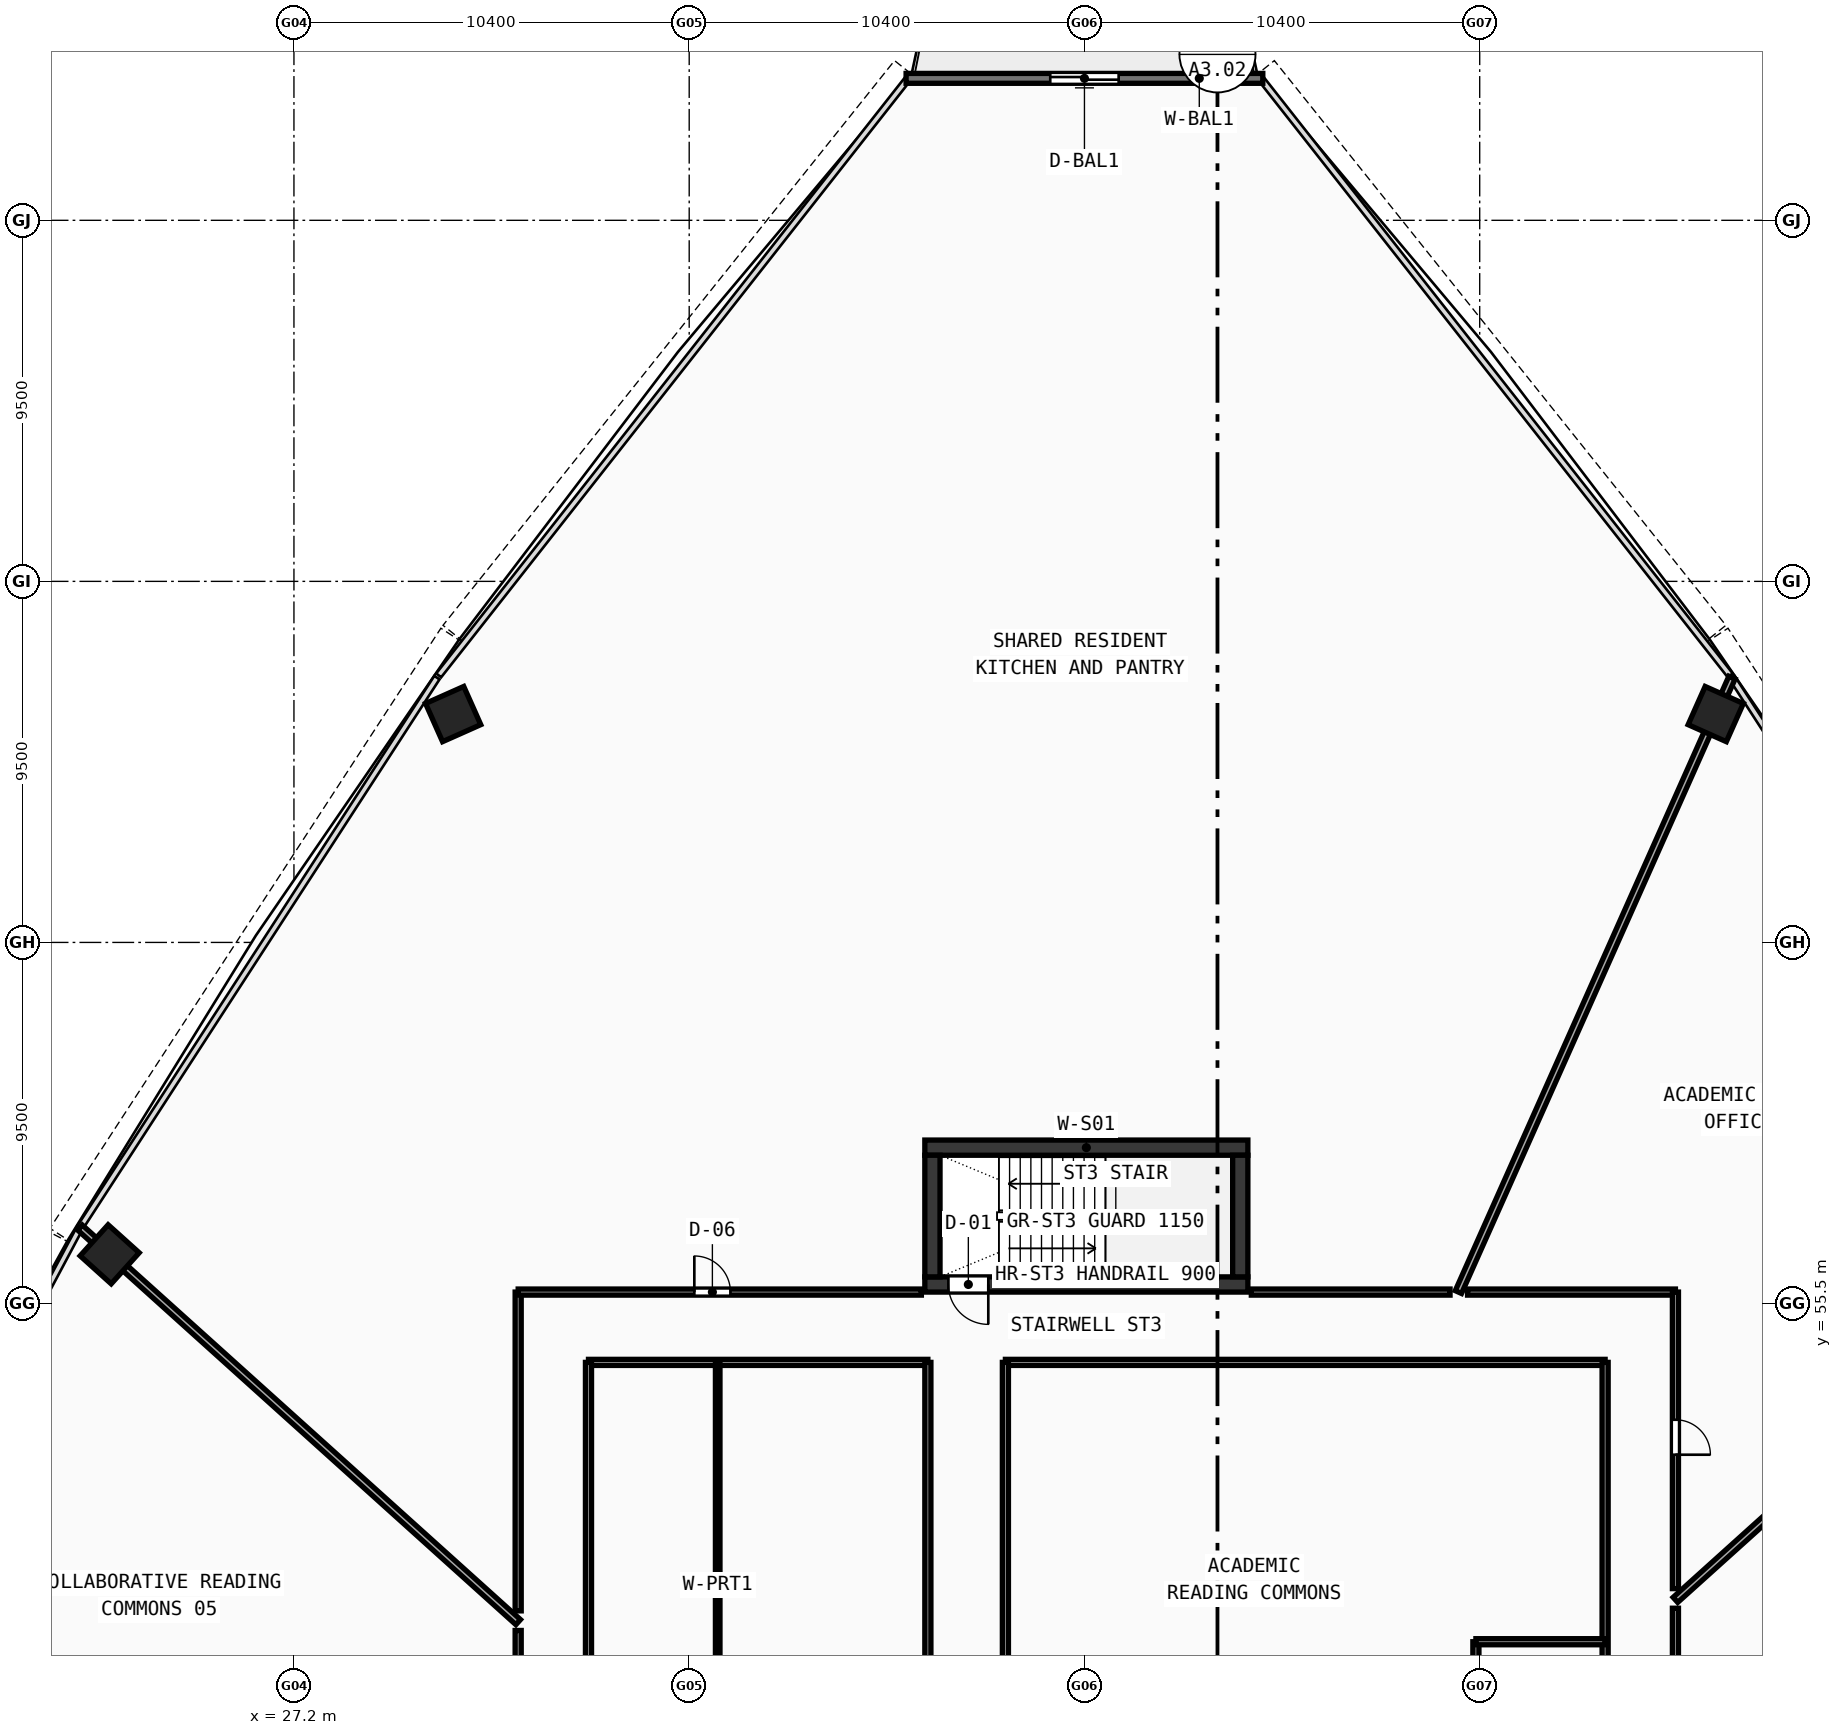
"""IFC4 building model, lengths in metres.
Left out: names, types, materials, properties, quantities, classifications, styles, units other than length and angle.
Written with IfcOpenShell. Run it as: python <this file> out.ifc"""

import sys

from ifc_helpers import new_model, si_unit, direction, frame, frame_2d, origin, origin_with_axes, origin_2d, place, context, subcontext, project, spatial, rectangle, hollow_rectangle, extrude, source, transform, mapped, element, fill, save


model = new_model("IFC4")
c1 = context("Model", 3, precision=1e-05, world=origin(), true_north=direction((0.0, 1.0)))
c2 = subcontext(c1, "Body", "Model", "MODEL_VIEW")
j1 = project(units=[si_unit("LENGTHUNIT", "METRE"), si_unit("PLANEANGLEUNIT", "RADIAN")], contexts=[c1])
p1 = place(None, origin())
s1 = spatial("IfcSite", under=j1, at=p1, CompositionType="ELEMENT")
p2 = place(p1, origin())
s2 = spatial("IfcBuilding", under=s1, at=p2, CompositionType="ELEMENT")
p3 = place(p2, frame((0.0, 0.0, 66.7)))
s3 = spatial("IfcBuildingStorey", under=s2, at=p3, CompositionType="ELEMENT", Elevation=66.7)
p4 = place(p3, frame((43.8, 59.6, 0.0), z_axis=(0.0, 0.0, 1.0), x_axis=(1.0, 0.0, 0.0)))
e1 = element("IfcWall", 1, at=p4, inside=s3, PredefinedType="SHEAR", context=c2, shape_type="SweptSolid", body=[
    extrude(rectangle(XDim=8.5, YDim=0.4, at=frame_2d((4.25, 0.0))), origin(), (0.0, 0.0, 1.0), 3.37),
])
p5 = place(p3, frame((43.8, 56.0, 0.0), z_axis=(0.0, 0.0, 1.0), x_axis=(1.0, 0.0, 0.0)))
e2 = element("IfcWall", 2, at=p5, inside=s3, PredefinedType="SHEAR", context=c2, shape_type="SweptSolid", body=[
    extrude(rectangle(XDim=8.5, YDim=0.4, at=frame_2d((4.25, 0.0))), origin(), (0.0, 0.0, 1.0), 3.37),
])
p6 = place(p5, frame((0.62, 0.0, 0.0)))
e3 = element("IfcOpeningElement", 3, at=p6, cuts=e2, PredefinedType="OPENING", context=c2, shape_type="SweptSolid", body=[
    extrude(rectangle(XDim=1.05, YDim=2.1, at=frame_2d((0.525, 1.05))), frame((0.0, 0.21, 0.0), z_axis=(0.0, -1.0, 0.0), x_axis=(1.0, 0.0, 0.0)), (0.0, 0.0, 1.0), 0.42),
])
for number, where, z_axis, x_axis in (
    (4, (44.0, 56.2, 0.0), (0.0, 0.0, 1.0), (0.0, 1.0, 0.0)),
    (5, (52.1, 56.2, 0.0), (0.0, 0.0, 1.0), (0.0, 1.0, 0.0)),
):
    element("IfcWall", number, at=place(p3, frame(where, z_axis=z_axis, x_axis=x_axis)), inside=s3, PredefinedType="SHEAR", context=c2, shape_type="SweptSolid", body=[
        extrude(rectangle(XDim=3.2, YDim=0.4, at=frame_2d((1.6, 0.0))), origin(), (0.0, 0.0, 1.0), 3.37),
    ])
m1 = source(origin(), c2, "Body", "SweptSolid", [
    extrude(hollow_rectangle(XDim=1.1, YDim=1.1, WallThickness=0.045, at=origin_2d()), origin(), (0.0, 0.0, 1.0), 3.63),
])
for number, where, z_axis, x_axis in (
    (6, (64.611, 71.009, -0.26), (0.0, 0.0, 1.0), (-0.914, 0.407, 0.0)),
    (7, (31.389, 71.009, -0.26), (0.0, 0.0, 1.0), (-0.914, -0.407, 0.0)),
    (8, (22.351, 56.794, -0.26), (0.0, 0.0, 1.0), (-0.669, -0.743, 0.0)),
):
    element("IfcColumn", number, at=place(p3, frame(where, z_axis=z_axis, x_axis=x_axis)), inside=s3, PredefinedType="COLUMN", context=c2, shape_type="MappedRepresentation", body=[
        mapped(m1, transform((0.0, 0.0, 0.0), scale=1.0)),
    ])
p7 = place(p3, frame((52.693, 87.735, 0.0), z_axis=(0.0, 0.0, 1.0), x_axis=(-1.0, 0.0, 0.0)))
e9 = element("IfcWall", 9, at=p7, inside=s3, PredefinedType="STANDARD", context=c2, shape_type="SweptSolid", body=[
    extrude(rectangle(XDim=9.386, YDim=0.26, at=frame_2d((4.693, 0.0))), origin(), (0.0, 0.0, 1.0), 3.37),
])
p8 = place(p7, frame((3.793, 0.0, 0.0)))
e10 = element("IfcOpeningElement", 10, at=p8, cuts=e9, PredefinedType="OPENING", context=c2, shape_type="SweptSolid", body=[
    extrude(rectangle(XDim=1.8, YDim=2.15, at=frame_2d((0.9, 1.075))), frame((0.0, 0.14, 0.0), z_axis=(0.0, -1.0, 0.0), x_axis=(1.0, 0.0, 0.0)), (0.0, 0.0, 1.0), 0.28),
])
p9 = place(p3, frame((34.95, 53.95, 0.0), z_axis=(0.0, 0.0, 1.0), x_axis=(1.0, 0.0, 0.0)))
e11 = element("IfcWall", 11, at=p9, inside=s3, PredefinedType="PARTITIONING", context=c2, shape_type="SweptSolid", body=[
    extrude(rectangle(XDim=8.93, YDim=0.16, at=frame_2d((4.465, 0.0))), origin(), (0.0, 0.0, 1.0), 2.67),
])
for number, where, z_axis, x_axis in (
    (12, (34.95, 42.25, 0.0), (0.0, 0.0, 1.0), (0.0, 1.0, 0.0)),
    (13, (43.88, 42.25, 0.0), (0.0, 0.0, 1.0), (0.0, 1.0, 0.0)),
):
    element("IfcWall", number, at=place(p3, frame(where, z_axis=z_axis, x_axis=x_axis)), inside=s3, PredefinedType="PARTITIONING", context=c2, shape_type="SweptSolid", body=[
        extrude(rectangle(XDim=11.7, YDim=0.16, at=frame_2d((5.85, 0.0))), origin(), (0.0, 0.0, 1.0), 2.67),
    ])
p10 = place(p3, frame((38.35, 42.25, 0.0), z_axis=(0.0, 0.0, 1.0), x_axis=(0.0, 1.0, 0.0)))
e14 = element("IfcWall", 14, at=p10, inside=s3, PredefinedType="PARTITIONING", context=c2, shape_type="SweptSolid", body=[
    extrude(rectangle(XDim=11.7, YDim=0.12, at=frame_2d((5.85, 0.0))), origin(), (0.0, 0.0, 1.0), 2.67),
])
p11 = place(p3, frame((45.92, 53.95, 0.0), z_axis=(0.0, 0.0, 1.0), x_axis=(1.0, 0.0, 0.0)))
e15 = element("IfcWall", 15, at=p11, inside=s3, PredefinedType="PARTITIONING", context=c2, shape_type="SweptSolid", body=[
    extrude(rectangle(XDim=15.78, YDim=0.16, at=frame_2d((7.89, 0.0))), origin(), (0.0, 0.0, 1.0), 2.67),
])
p12 = place(p3, frame((45.92, 42.25, 0.0), z_axis=(0.0, 0.0, 1.0), x_axis=(0.0, 1.0, 0.0)))
e16 = element("IfcWall", 16, at=p12, inside=s3, PredefinedType="PARTITIONING", context=c2, shape_type="SweptSolid", body=[
    extrude(rectangle(XDim=11.7, YDim=0.16, at=frame_2d((5.85, 0.0))), origin(), (0.0, 0.0, 1.0), 2.97),
])
p13 = place(p3, frame((61.7, 42.25, 0.0), z_axis=(0.0, 0.0, 1.0), x_axis=(0.0, 1.0, 0.0)))
e17 = element("IfcWall", 17, at=p13, inside=s3, PredefinedType="PARTITIONING", context=c2, shape_type="SweptSolid", body=[
    extrude(rectangle(XDim=11.7, YDim=0.16, at=frame_2d((5.85, 0.0))), origin(), (0.0, 0.0, 1.0), 2.67),
])
p14 = place(p3, frame((58.3, 42.25, 0.0), z_axis=(0.0, 0.0, 1.0), x_axis=(0.0, 1.0, 0.0)))
e18 = element("IfcWall", 18, at=p14, inside=s3, PredefinedType="PARTITIONING", context=c2, shape_type="SweptSolid", body=[
    extrude(rectangle(XDim=4.35, YDim=0.16, at=frame_2d((2.175, 0.0))), origin(), (0.0, 0.0, 1.0), 2.67),
])
p15 = place(p3, frame((58.3, 46.6, 0.0), z_axis=(0.0, 0.0, 1.0), x_axis=(1.0, 0.0, 0.0)))
e19 = element("IfcWall", 19, at=p15, inside=s3, PredefinedType="PARTITIONING", context=c2, shape_type="SweptSolid", body=[
    extrude(rectangle(XDim=3.4, YDim=0.16, at=frame_2d((1.7, 0.0))), origin(), (0.0, 0.0, 1.0), 2.97),
])
p16 = place(p3, frame((63.55, 47.701, 0.0), z_axis=(0.0, 0.0, 1.0), x_axis=(0.743144860423, 0.669130567547, 0.0)))
e20 = element("IfcWall", 20, at=p16, inside=s3, PredefinedType="PARTITIONING", context=c2, shape_type="SweptSolid", body=[
    extrude(rectangle(XDim=14.639, YDim=0.18, at=frame_2d((7.319, 0.0))), origin(), (0.0, 0.0, 1.0), 2.67),
])
p17 = place(p3, frame((57.84, 55.8, 0.0), z_axis=(0.0, 0.0, 1.0), x_axis=(0.406732277088, 0.913547401493, 0.0)))
e21 = element("IfcWall", 21, at=p17, inside=s3, PredefinedType="PARTITIONING", context=c2, shape_type="SweptSolid", body=[
    extrude(rectangle(XDim=17.698, YDim=0.18, at=frame_2d((8.849, 0.0))), origin(), (0.0, 0.0, 1.0), 2.67),
])
p18 = place(p3, frame((33.1, 47.116, 0.0), z_axis=(0.0, 0.0, 1.0), x_axis=(-0.743143105339, 0.669132516761, 0.0)))
e22 = element("IfcWall", 22, at=p18, inside=s3, PredefinedType="PARTITIONING", context=c2, shape_type="SweptSolid", body=[
    extrude(rectangle(XDim=15.514, YDim=0.18, at=frame_2d((7.757, 0.0))), origin(), (0.0, 0.0, 1.0), 2.67),
])
p19 = place(p3, frame((33.1, 38.773, 0.0), z_axis=(0.0, 0.0, 1.0), x_axis=(0.0, 1.0, 0.0)))
e23 = element("IfcWall", 23, at=p19, inside=s3, PredefinedType="PARTITIONING", context=c2, shape_type="SweptSolid", body=[
    extrude(rectangle(XDim=8.124, YDim=0.16, at=frame_2d((4.062, 0.0))), origin(), (0.0, 0.0, 1.0), 2.67),
])
p20 = place(p19, frame((3.581, 0.0, 0.0)))
e24 = element("IfcOpeningElement", 24, at=p20, cuts=e23, PredefinedType="OPENING", context=c2, shape_type="SweptSolid", body=[
    extrude(rectangle(XDim=0.95, YDim=2.1, at=frame_2d((0.475, 1.05))), frame((0.0, 0.09, 0.0), z_axis=(0.0, -1.0, 0.0), x_axis=(1.0, 0.0, 0.0)), (0.0, 0.0, 1.0), 0.18),
])
p21 = place(p3, frame((33.1, 47.412, 0.0), z_axis=(0.0, 0.0, 1.0), x_axis=(0.0, 1.0, 0.0)))
e25 = element("IfcWall", 25, at=p21, inside=s3, PredefinedType="PARTITIONING", context=c2, shape_type="SweptSolid", body=[
    extrude(rectangle(XDim=8.388, YDim=0.16, at=frame_2d((4.194, 0.0))), origin(), (0.0, 0.0, 1.0), 3.37),
])
p22 = place(p3, frame((33.1, 55.8, 0.0), z_axis=(0.0, 0.0, 1.0), x_axis=(1.0, 0.0, 0.0)))
e26 = element("IfcWall", 26, at=p22, inside=s3, PredefinedType="PARTITIONING", context=c2, shape_type="SweptSolid", body=[
    extrude(rectangle(XDim=10.609, YDim=0.16, at=frame_2d((5.304, 0.0))), origin(), (0.0, 0.0, 1.0), 2.67),
])
p23 = place(p22, frame((4.635, 0.0, 0.0)))
e27 = element("IfcOpeningElement", 27, at=p23, cuts=e26, PredefinedType="OPENING", context=c2, shape_type="SweptSolid", body=[
    extrude(rectangle(XDim=0.95, YDim=2.1, at=frame_2d((0.475, 1.05))), frame((0.0, 0.09, 0.0), z_axis=(0.0, -1.0, 0.0), x_axis=(1.0, 0.0, 0.0)), (0.0, 0.0, 1.0), 0.18),
])
p24 = place(p3, frame((52.391, 55.8, 0.0), z_axis=(0.0, 0.0, 1.0), x_axis=(1.0, 0.0, 0.0)))
e28 = element("IfcWall", 28, at=p24, inside=s3, PredefinedType="PARTITIONING", context=c2, shape_type="SweptSolid", body=[
    extrude(rectangle(XDim=5.229, YDim=0.16, at=frame_2d((2.614, 0.0))), origin(), (0.0, 0.0, 1.0), 2.67),
])
p25 = place(p3, frame((58.08, 55.8, 0.0), z_axis=(0.0, 0.0, 1.0), x_axis=(1.0, 0.0, 0.0)))
e29 = element("IfcWall", 29, at=p25, inside=s3, PredefinedType="PARTITIONING", context=c2, shape_type="SweptSolid", body=[
    extrude(rectangle(XDim=5.47, YDim=0.16, at=frame_2d((2.735, 0.0))), origin(), (0.0, 0.0, 1.0), 3.37),
])
p26 = place(p3, frame((63.55, 55.8, 0.0), z_axis=(0.0, 0.0, 1.0), x_axis=(0.0, -1.0, 0.0)))
e30 = element("IfcWall", 30, at=p26, inside=s3, PredefinedType="PARTITIONING", context=c2, shape_type="SweptSolid", body=[
    extrude(rectangle(XDim=7.803, YDim=0.16, at=frame_2d((3.901, 0.0))), origin(), (0.0, 0.0, 1.0), 3.37),
])
p27 = place(p26, frame((3.359, 0.0, 0.0)))
e31 = element("IfcOpeningElement", 31, at=p27, cuts=e30, PredefinedType="OPENING", context=c2, shape_type="SweptSolid", body=[
    extrude(rectangle(XDim=0.92, YDim=2.1, at=frame_2d((0.46, 1.05))), frame((0.0, 0.09, 0.0), z_axis=(0.0, -1.0, 0.0), x_axis=(1.0, 0.0, 0.0)), (0.0, 0.0, 1.0), 0.18),
])
p28 = place(p3, frame((63.55, 47.482, 0.0), z_axis=(0.0, 0.0, 1.0), x_axis=(0.0, -1.0, 0.0)))
e32 = element("IfcWall", 32, at=p28, inside=s3, PredefinedType="PARTITIONING", context=c2, shape_type="SweptSolid", body=[
    extrude(rectangle(XDim=8.498, YDim=0.16, at=frame_2d((4.249, 0.0))), origin(), (0.0, 0.0, 1.0), 2.67),
])
p29 = place(p28, frame((3.795, 0.0, 0.0)))
e33 = element("IfcOpeningElement", 33, at=p29, cuts=e32, PredefinedType="OPENING", context=c2, shape_type="SweptSolid", body=[
    extrude(rectangle(XDim=0.92, YDim=2.1, at=frame_2d((0.46, 1.05))), frame((0.0, 0.09, 0.0), z_axis=(0.0, -1.0, 0.0), x_axis=(1.0, 0.0, 0.0)), (0.0, 0.0, 1.0), 0.18),
])
m2 = source(origin(), c2, "Body", "SweptSolid", [
    extrude(rectangle(XDim=1.8, YDim=2.15, at=frame_2d((0.9, 1.075))), frame((0.0, 0.025, 0.0), z_axis=(0.0, -1.0, 0.0), x_axis=(1.0, 0.0, 0.0)), (0.0, 0.0, 1.0), 0.05),
])
p30 = place(p8, origin_with_axes())
e34 = element("IfcDoor", 34, at=p30, inside=s3, OperationType="DOUBLE_DOOR_SLIDING", PredefinedType="DOOR", context=c2, shape_type="MappedRepresentation", body=[
    mapped(m2, transform((0.0, 0.0, 0.0), scale=1.0)),
])
fill(e10, e34)
m3 = source(origin(), c2, "Body", "SweptSolid", [
    extrude(rectangle(XDim=1.05, YDim=2.1, at=frame_2d((0.525, 1.05))), frame((0.0, 0.025, 0.0), z_axis=(0.0, -1.0, 0.0), x_axis=(1.0, 0.0, 0.0)), (0.0, 0.0, 1.0), 0.05),
])
p31 = place(p6, frame((1.05, 0.0, 0.0), z_axis=(0.0, 0.0, 1.0), x_axis=(-1.0, 0.0, 0.0)))
e35 = element("IfcDoor", 35, at=p31, inside=s3, OperationType="SINGLE_SWING_LEFT", PredefinedType="DOOR", context=c2, shape_type="MappedRepresentation", body=[
    mapped(m3, transform((0.0, 0.0, 0.0), scale=1.0)),
])
fill(e3, e35)
m4 = source(origin(), c2, "Body", "SweptSolid", [
    extrude(rectangle(XDim=0.92, YDim=2.1, at=frame_2d((0.46, 1.05))), frame((0.0, 0.025, 0.0), z_axis=(0.0, -1.0, 0.0), x_axis=(1.0, 0.0, 0.0)), (0.0, 0.0, 1.0), 0.05),
])
p32 = place(p27, origin_with_axes())
e36 = element("IfcDoor", 36, at=p32, inside=s3, OperationType="SINGLE_SWING_RIGHT", PredefinedType="DOOR", context=c2, shape_type="MappedRepresentation", body=[
    mapped(m4, transform((0.0, 0.0, 0.0), scale=1.0)),
])
fill(e31, e36)
m5 = source(origin(), c2, "Body", "SweptSolid", [
    extrude(rectangle(XDim=0.95, YDim=2.1, at=frame_2d((0.475, 1.05))), frame((0.0, 0.025, 0.0), z_axis=(0.0, -1.0, 0.0), x_axis=(1.0, 0.0, 0.0)), (0.0, 0.0, 1.0), 0.05),
])
p33 = place(p23, origin_with_axes())
e37 = element("IfcDoor", 37, at=p33, inside=s3, OperationType="SINGLE_SWING_LEFT", PredefinedType="DOOR", context=c2, shape_type="MappedRepresentation", body=[
    mapped(m5, transform((0.0, 0.0, 0.0), scale=1.0)),
])
fill(e27, e37)
save(model, sys.argv[1])
